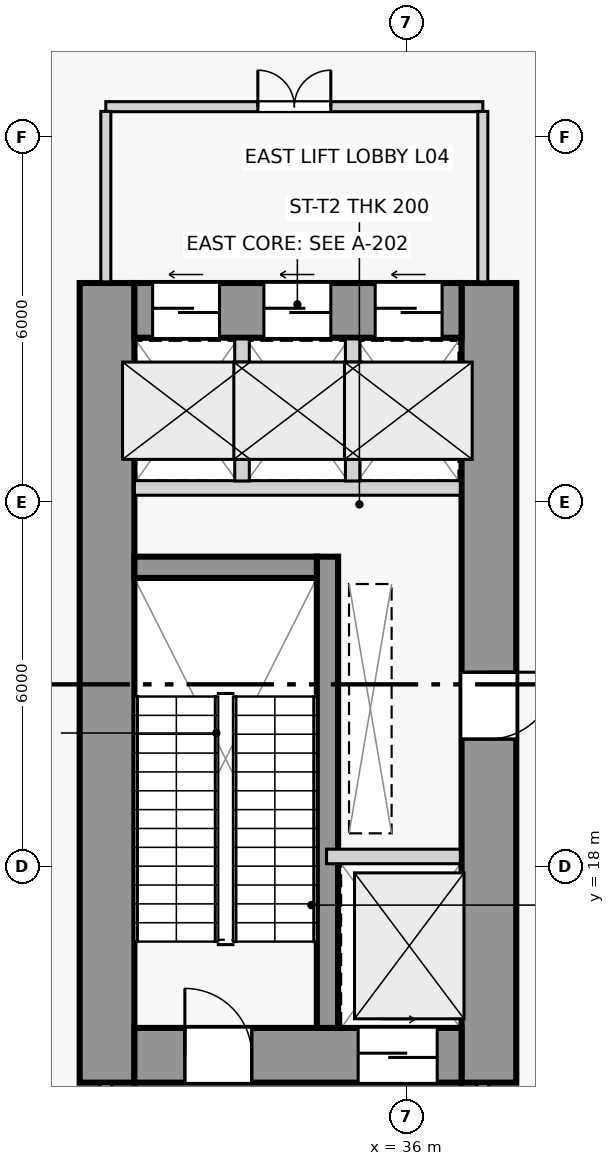
"""IFC4 building model, lengths in metres.
Left out: names, types, materials, properties, quantities, classifications, styles, units other than length and angle.
Written with IfcOpenShell. Run it as: python <this file> out.ifc"""

import sys

from ifc_helpers import new_model, si_unit, direction, frame, frame_2d, origin, place, context, subcontext, project, spatial, rectangle, extrude, source, transform, mapped, element, fill, save


model = new_model("IFC4")
c1 = context("Model", 3, precision=1e-05, world=origin(), true_north=direction((0.0, 1.0)))
c2 = subcontext(c1, "Body", "Model", "MODEL_VIEW")
j1 = project(units=[si_unit("LENGTHUNIT", "METRE"), si_unit("PLANEANGLEUNIT", "RADIAN")], contexts=[c1])
p1 = place(None, origin())
s1 = spatial("IfcSite", under=j1, at=p1, CompositionType="ELEMENT")
p2 = place(p1, origin())
s2 = spatial("IfcBuilding", under=s1, at=p2, CompositionType="ELEMENT")
p3 = place(p2, frame((0.0, 0.0, 18.0)))
s3 = spatial("IfcBuildingStorey", under=s2, at=p3, CompositionType="ELEMENT", Elevation=18.0)
p4 = place(p3, frame((31.07, 14.45, 0.0), z_axis=(0.0, 0.0, 1.0), x_axis=(0.0, 1.0, 0.0)))
e1 = element("IfcWall", 1, at=p4, inside=s3, PredefinedType="SHEAR", context=c2, shape_type="SweptSolid", body=[
    extrude(rectangle(XDim=13.15, YDim=0.9, at=frame_2d((6.575, 0.0))), origin(), (0.0, 0.0, 1.0), 4.5),
])
p5 = place(p3, frame((37.35, 14.45, 0.0), z_axis=(0.0, 0.0, 1.0), x_axis=(0.0, 1.0, 0.0)))
e2 = element("IfcWall", 2, at=p5, inside=s3, PredefinedType="SHEAR", context=c2, shape_type="SweptSolid", body=[
    extrude(rectangle(XDim=13.15, YDim=0.9, at=frame_2d((6.575, 0.0))), origin(), (0.0, 0.0, 1.0), 4.5),
])
p6 = place(p5, frame((5.65, 0.0, 0.0)))
e3 = element("IfcOpeningElement", 3, at=p6, cuts=e2, PredefinedType="OPENING", context=c2, shape_type="SweptSolid", body=[
    extrude(rectangle(XDim=1.1, YDim=2.2, at=frame_2d((0.55, 1.1))), frame((0.0, 0.46, 0.0), z_axis=(0.0, -1.0, 0.0), x_axis=(1.0, 0.0, 0.0)), (0.0, 0.0, 1.0), 0.92),
])
p7 = place(p3, frame((31.52, 14.9, 0.0), z_axis=(0.0, 0.0, 1.0), x_axis=(1.0, 0.0, 0.0)))
e4 = element("IfcWall", 4, at=p7, inside=s3, PredefinedType="SHEAR", context=c2, shape_type="SweptSolid", body=[
    extrude(rectangle(XDim=5.38, YDim=0.9, at=frame_2d((2.69, 0.0))), origin(), (0.0, 0.0, 1.0), 4.5),
])
p8 = place(p7, frame((0.83, 0.0, 0.0)))
e5 = element("IfcOpeningElement", 5, at=p8, cuts=e4, PredefinedType="OPENING", context=c2, shape_type="SweptSolid", body=[
    extrude(rectangle(XDim=1.1, YDim=2.2, at=frame_2d((0.55, 1.1))), frame((0.0, 0.46, 0.0), z_axis=(0.0, -1.0, 0.0), x_axis=(1.0, 0.0, 0.0)), (0.0, 0.0, 1.0), 0.92),
])
p9 = place(p7, frame((3.68, 0.0, 0.0)))
e6 = element("IfcOpeningElement", 6, at=p9, cuts=e4, PredefinedType="OPENING", context=c2, shape_type="SweptSolid", body=[
    extrude(rectangle(XDim=1.3, YDim=2.2, at=frame_2d((0.65, 1.1))), frame((0.0, 0.46, 0.0), z_axis=(0.0, -1.0, 0.0), x_axis=(1.0, 0.0, 0.0)), (0.0, 0.0, 1.0), 0.92),
])
p10 = place(p3, frame((31.52, 27.15, 0.0), z_axis=(0.0, 0.0, 1.0), x_axis=(1.0, 0.0, 0.0)))
e7 = element("IfcWall", 7, at=p10, inside=s3, PredefinedType="SHEAR", context=c2, shape_type="SweptSolid", body=[
    extrude(rectangle(XDim=5.38, YDim=0.9, at=frame_2d((2.69, 0.0))), origin(), (0.0, 0.0, 1.0), 4.5),
])
p11 = place(p10, frame((0.3, 0.0, 0.0)))
e8 = element("IfcOpeningElement", 8, at=p11, cuts=e7, PredefinedType="OPENING", context=c2, shape_type="SweptSolid", body=[
    extrude(rectangle(XDim=1.1, YDim=2.2, at=frame_2d((0.55, 1.1))), frame((0.0, 0.46, 0.0), z_axis=(0.0, -1.0, 0.0), x_axis=(1.0, 0.0, 0.0)), (0.0, 0.0, 1.0), 0.92),
])
p12 = place(p10, frame((2.13, 0.0, 0.0)))
e9 = element("IfcOpeningElement", 9, at=p12, cuts=e7, PredefinedType="OPENING", context=c2, shape_type="SweptSolid", body=[
    extrude(rectangle(XDim=1.1, YDim=2.2, at=frame_2d((0.55, 1.1))), frame((0.0, 0.46, 0.0), z_axis=(0.0, -1.0, 0.0), x_axis=(1.0, 0.0, 0.0)), (0.0, 0.0, 1.0), 0.92),
])
p13 = place(p10, frame((3.96, 0.0, 0.0)))
e10 = element("IfcOpeningElement", 10, at=p13, cuts=e7, PredefinedType="OPENING", context=c2, shape_type="SweptSolid", body=[
    extrude(rectangle(XDim=1.1, YDim=2.2, at=frame_2d((0.55, 1.1))), frame((0.0, 0.46, 0.0), z_axis=(0.0, -1.0, 0.0), x_axis=(1.0, 0.0, 0.0)), (0.0, 0.0, 1.0), 0.92),
])
p14 = place(p3, frame((34.695, 15.35, 0.0), z_axis=(0.0, 0.0, 1.0), x_axis=(0.0, 1.0, 0.0)))
e11 = element("IfcWall", 11, at=p14, inside=s3, PredefinedType="SHEAR", context=c2, shape_type="SweptSolid", body=[
    extrude(rectangle(XDim=7.75, YDim=0.35, at=frame_2d((3.875, 0.0))), origin(), (0.0, 0.0, 1.0), 4.5),
])
p15 = place(p3, frame((31.52, 22.925, 0.0), z_axis=(0.0, 0.0, 1.0), x_axis=(1.0, 0.0, 0.0)))
e12 = element("IfcWall", 12, at=p15, inside=s3, PredefinedType="SHEAR", context=c2, shape_type="SweptSolid", body=[
    extrude(rectangle(XDim=3.0, YDim=0.35, at=frame_2d((1.5, 0.0))), origin(), (0.0, 0.0, 1.0), 4.5),
])
p16 = place(p3, frame((34.68, 18.17, 0.0), z_axis=(0.0, 0.0, 1.0), x_axis=(1.0, 0.0, 0.0)))
e13 = element("IfcWall", 13, at=p16, inside=s3, PredefinedType="PARTITIONING", context=c2, shape_type="SweptSolid", body=[
    extrude(rectangle(XDim=2.2, YDim=0.24, at=frame_2d((1.1, 0.0))), origin(), (0.0, 0.0, 1.0), 3.85),
])
p17 = place(p3, frame((31.05, 11.445, 0.0), z_axis=(0.0, 0.0, 1.0), x_axis=(0.0, 1.0, 0.0)))
e14 = element("IfcWall", 14, at=p17, inside=s3, PredefinedType="PARTITIONING", context=c2, shape_type="SweptSolid", body=[
    extrude(rectangle(XDim=2.985, YDim=0.2, at=frame_2d((1.492, 0.0))), origin(), (0.0, 0.0, 1.0), 2.72),
])
p18 = place(p3, frame((37.25, 11.445, 0.0), z_axis=(0.0, 0.0, 1.0), x_axis=(0.0, 1.0, 0.0)))
e15 = element("IfcWall", 15, at=p18, inside=s3, PredefinedType="PARTITIONING", context=c2, shape_type="SweptSolid", body=[
    extrude(rectangle(XDim=2.985, YDim=0.2, at=frame_2d((1.492, 0.0))), origin(), (0.0, 0.0, 1.0), 3.85),
])
p19 = place(p3, frame((31.52, 24.23, 0.0), z_axis=(0.0, 0.0, 1.0), x_axis=(1.0, 0.0, 0.0)))
e16 = element("IfcWall", 16, at=p19, inside=s3, PredefinedType="PARTITIONING", context=c2, shape_type="SweptSolid", body=[
    extrude(rectangle(XDim=5.36, YDim=0.24, at=frame_2d((2.68, 0.0))), origin(), (0.0, 0.0, 1.0), 3.85),
])
for number, where, z_axis, x_axis in (
    (17, (33.29, 24.345, 0.0), (0.0, 0.0, 1.0), (0.0, 1.0, 0.0)),
    (18, (35.11, 24.345, 0.0), (0.0, 0.0, 1.0), (0.0, 1.0, 0.0)),
):
    element("IfcWall", number, at=place(p3, frame(where, z_axis=z_axis, x_axis=x_axis)), inside=s3, PredefinedType="PARTITIONING", context=c2, shape_type="SweptSolid", body=[
        extrude(rectangle(XDim=2.335, YDim=0.24, at=frame_2d((1.167, 0.0))), origin(), (0.0, 0.0, 1.0), 3.85),
    ])
p20 = place(p3, frame((31.05, 30.5, 0.0), z_axis=(0.0, 0.0, 1.0), x_axis=(1.0, 0.0, 0.0)))
e19 = element("IfcWall", 19, at=p20, inside=s3, PredefinedType="PARTITIONING", context=c2, shape_type="SweptSolid", body=[
    extrude(rectangle(XDim=6.2, YDim=0.165, at=frame_2d((3.1, 0.0))), origin(), (0.0, 0.0, 1.0), 3.85),
])
p21 = place(p20, frame((2.5, 0.0, 0.0)))
e20 = element("IfcOpeningElement", 20, at=p21, cuts=e19, PredefinedType="OPENING", context=c2, shape_type="SweptSolid", body=[
    extrude(rectangle(XDim=1.2, YDim=2.2, at=frame_2d((0.6, 1.1))), frame((0.0, 0.093, 0.0), z_axis=(0.0, -1.0, 0.0), x_axis=(1.0, 0.0, 0.0)), (0.0, 0.0, 1.0), 0.185),
])
p22 = place(p3, frame((31.05, 27.62, 0.0), z_axis=(0.0, 0.0, 1.0), x_axis=(0.0, 1.0, 0.0)))
e21 = element("IfcWall", 21, at=p22, inside=s3, PredefinedType="PARTITIONING", context=c2, shape_type="SweptSolid", body=[
    extrude(rectangle(XDim=2.802, YDim=0.165, at=frame_2d((1.401, 0.0))), origin(), (0.0, 0.0, 1.0), 2.52),
])
p23 = place(p3, frame((37.25, 27.62, 0.0), z_axis=(0.0, 0.0, 1.0), x_axis=(0.0, 1.0, 0.0)))
e22 = element("IfcWall", 22, at=p23, inside=s3, PredefinedType="PARTITIONING", context=c2, shape_type="SweptSolid", body=[
    extrude(rectangle(XDim=2.802, YDim=0.165, at=frame_2d((1.401, 0.0))), origin(), (0.0, 0.0, 1.0), 3.85),
])
m1 = source(origin(), c2, "Body", "SweptSolid", [
    extrude(rectangle(XDim=1.1, YDim=2.2, at=frame_2d((0.55, 1.1))), frame((0.0, 0.025, 0.0), z_axis=(0.0, -1.0, 0.0), x_axis=(1.0, 0.0, 0.0)), (0.0, 0.0, 1.0), 0.05),
])
p24 = place(p8, origin())
e23 = element("IfcDoor", 23, at=p24, inside=s3, OperationType="SINGLE_SWING_LEFT", PredefinedType="DOOR", context=c2, shape_type="MappedRepresentation", body=[
    mapped(m1, transform((0.0, 0.0, 0.0), scale=1.0)),
])
fill(e5, e23)
m2 = source(origin(), c2, "Body", "SweptSolid", [
    extrude(rectangle(XDim=1.3, YDim=2.2, at=frame_2d((0.65, 1.1))), frame((0.0, 0.025, 0.0), z_axis=(0.0, -1.0, 0.0), x_axis=(1.0, 0.0, 0.0)), (0.0, 0.0, 1.0), 0.05),
])
p25 = place(p9, origin())
e24 = element("IfcDoor", 24, at=p25, inside=s3, OperationType="SLIDING_TO_RIGHT", PredefinedType="DOOR", context=c2, shape_type="MappedRepresentation", body=[
    mapped(m2, transform((0.0, 0.0, 0.0), scale=1.0)),
])
fill(e6, e24)
m3 = source(origin(), c2, "Body", "SweptSolid", [
    extrude(rectangle(XDim=1.1, YDim=2.2, at=frame_2d((0.55, 1.1))), frame((0.0, 0.025, 0.0), z_axis=(0.0, -1.0, 0.0), x_axis=(1.0, 0.0, 0.0)), (0.0, 0.0, 1.0), 0.05),
])
p26 = place(p11, origin())
e25 = element("IfcDoor", 25, at=p26, inside=s3, OperationType="SLIDING_TO_LEFT", PredefinedType="DOOR", context=c2, shape_type="MappedRepresentation", body=[
    mapped(m3, transform((0.0, 0.0, 0.0), scale=1.0)),
])
fill(e8, e25)
p27 = place(p12, origin())
e26 = element("IfcDoor", 26, at=p27, inside=s3, OperationType="SLIDING_TO_LEFT", PredefinedType="DOOR", context=c2, shape_type="MappedRepresentation", body=[
    mapped(m3, transform((0.0, 0.0, 0.0), scale=1.0)),
])
fill(e9, e26)
p28 = place(p13, origin())
e27 = element("IfcDoor", 27, at=p28, inside=s3, OperationType="SLIDING_TO_LEFT", PredefinedType="DOOR", context=c2, shape_type="MappedRepresentation", body=[
    mapped(m3, transform((0.0, 0.0, 0.0), scale=1.0)),
])
fill(e10, e27)
m4 = source(origin(), c2, "Body", "SweptSolid", [
    extrude(rectangle(XDim=1.2, YDim=2.2, at=frame_2d((0.6, 1.1))), frame((0.0, 0.025, 0.0), z_axis=(0.0, -1.0, 0.0), x_axis=(1.0, 0.0, 0.0)), (0.0, 0.0, 1.0), 0.05),
])
p29 = place(p21, origin())
e28 = element("IfcDoor", 28, at=p29, inside=s3, OperationType="DOUBLE_DOOR_SINGLE_SWING", PredefinedType="DOOR", context=c2, shape_type="MappedRepresentation", body=[
    mapped(m4, transform((0.0, 0.0, 0.0), scale=1.0)),
])
fill(e20, e28)
p30 = place(p6, frame((1.1, 0.0, 0.0), z_axis=(0.0, 0.0, 1.0), x_axis=(-1.0, 0.0, 0.0)))
e29 = element("IfcDoor", 29, at=p30, inside=s3, OperationType="SINGLE_SWING_LEFT", PredefinedType="DOOR", context=c2, shape_type="MappedRepresentation", body=[
    mapped(m1, transform((0.0, 0.0, 0.0), scale=1.0)),
])
fill(e3, e29)
save(model, sys.argv[1])
